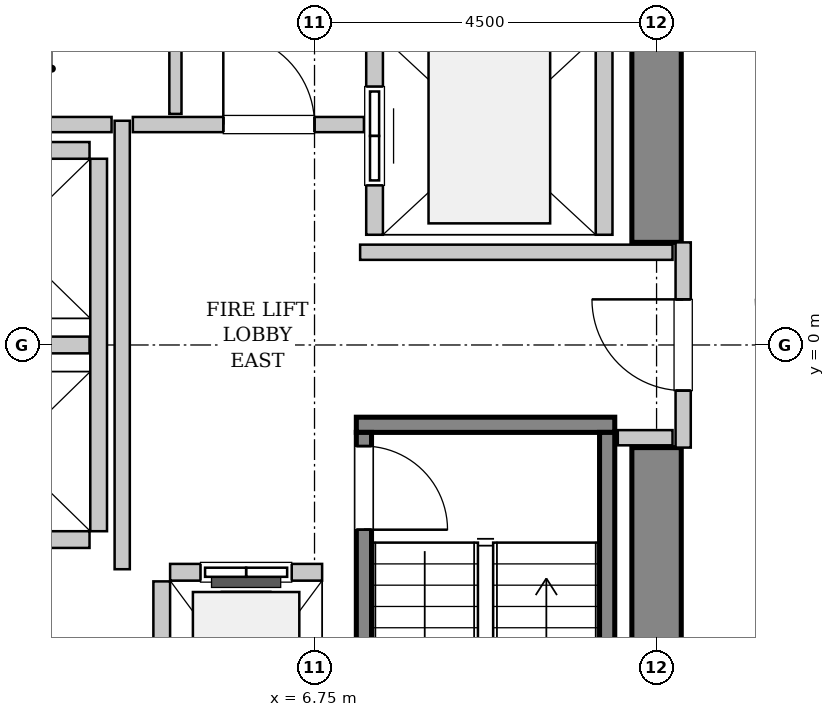
"""IFC4 building model, lengths in metres.
Left out: names, types, materials, properties, quantities, classifications, styles, units other than length and angle.
Written with IfcOpenShell. Run it as: python <this file> out.ifc"""

import sys

from ifc_helpers import new_model, si_unit, direction, frame, frame_2d, origin, place, context, subcontext, project, spatial, rectangle, extrude, source, transform, mapped, element, fill, save


model = new_model("IFC4")
c1 = context("Model", 3, precision=1e-05, world=origin(), true_north=direction((0.0, 1.0)))
c2 = subcontext(c1, "Body", "Model", "MODEL_VIEW")
j1 = project(units=[si_unit("LENGTHUNIT", "METRE"), si_unit("PLANEANGLEUNIT", "RADIAN")], contexts=[c1])
p1 = place(None, origin())
s1 = spatial("IfcSite", under=j1, at=p1, CompositionType="ELEMENT")
p2 = place(p1, origin())
s2 = spatial("IfcBuilding", under=s1, at=p2, CompositionType="ELEMENT")
p3 = place(p2, frame((0.0, 0.0, 27.6)))
s3 = spatial("IfcBuildingStorey", under=s2, at=p3, CompositionType="ELEMENT", Elevation=27.6)
m1 = source(origin(), c2, "Body", "SweptSolid", [
    extrude(rectangle(XDim=7.325, YDim=0.65, at=frame_2d((3.663, 0.0))), origin(), (0.0, 0.0, 1.0), 5.4),
])
for number, where, z_axis, x_axis in (
    (1, (11.25, -8.675, 0.0), (0.0, 0.0, 1.0), (0.0, 1.0, 0.0)),
    (2, (11.25, 1.35, 0.0), (0.0, 0.0, 1.0), (0.0, 1.0, 0.0)),
):
    element("IfcWall", number, at=place(p3, frame(where, z_axis=z_axis, x_axis=x_axis)), inside=s3, PredefinedType="SHEAR", context=c2, shape_type="MappedRepresentation", body=[
        mapped(m1, transform((0.0, 0.0, 0.0), x_axis=(1.0, 0.0, 0.0), y_axis=(0.0, 1.0, 0.0), z_axis=(0.0, 0.0, 1.0), scale=1.0)),
    ])
m2 = source(origin(), c2, "Body", "SweptSolid", [
    extrude(rectangle(XDim=3.4, YDim=0.2, at=frame_2d((1.7, 0.0))), origin(), (0.0, 0.0, 1.0), 5.4),
])
p4 = place(p3, frame((7.3, -1.05, 0.0), z_axis=(0.0, 0.0, 1.0), x_axis=(1.0, 0.0, 0.0)))
e3 = element("IfcWall", 3, at=p4, inside=s3, PredefinedType="SOLIDWALL", context=c2, shape_type="MappedRepresentation", body=[
    mapped(m2, transform((0.0, 0.0, 0.0), x_axis=(1.0, 0.0, 0.0), y_axis=(0.0, 1.0, 0.0), z_axis=(0.0, 0.0, 1.0), scale=1.0)),
])
m3 = source(origin(), c2, "Body", "SweptSolid", [
    extrude(rectangle(XDim=7.1, YDim=0.2, at=frame_2d((3.55, 0.0))), origin(), (0.0, 0.0, 1.0), 5.4),
])
p5 = place(p3, frame((7.4, -1.15, 0.0), z_axis=(0.0, 0.0, 1.0), x_axis=(0.0, -1.0, 0.0)))
e4 = element("IfcWall", 4, at=p5, inside=s3, PredefinedType="SOLIDWALL", context=c2, shape_type="MappedRepresentation", body=[
    mapped(m3, transform((0.0, 0.0, 0.0), x_axis=(1.0, 0.0, 0.0), y_axis=(0.0, 1.0, 0.0), z_axis=(0.0, 0.0, 1.0), scale=1.0)),
])
p6 = place(p5, frame((0.18, 0.0, 0.0)))
e5 = element("IfcOpeningElement", 5, at=p6, cuts=e4, PredefinedType="OPENING", context=c2, shape_type="SweptSolid", body=[
    extrude(rectangle(XDim=1.1, YDim=2.15, at=frame_2d((0.55, 1.075))), frame((0.0, 0.11, 0.0), z_axis=(0.0, -1.0, 0.0), x_axis=(1.0, 0.0, 0.0)), (0.0, 0.0, 1.0), 0.22),
])
p7 = place(p3, frame((10.6, -1.15, 0.0), z_axis=(0.0, 0.0, 1.0), x_axis=(0.0, -1.0, 0.0)))
e6 = element("IfcWall", 6, at=p7, inside=s3, PredefinedType="SOLIDWALL", context=c2, shape_type="MappedRepresentation", body=[
    mapped(m3, transform((0.0, 0.0, 0.0), x_axis=(1.0, 0.0, 0.0), y_axis=(0.0, 1.0, 0.0), z_axis=(0.0, 0.0, 1.0), scale=1.0)),
])
m4 = source(origin(), c2, "Body", "SweptSolid", [
    extrude(rectangle(XDim=2.0, YDim=0.22, at=frame_2d((1.0, 0.0))), origin(), (0.0, 0.0, 1.0), 5.135),
])
p8 = place(p3, frame((6.85, -2.99, 0.0), z_axis=(0.0, 0.0, 1.0), x_axis=(-1.0, 0.0, 0.0)))
e7 = element("IfcWall", 7, at=p8, inside=s3, PredefinedType="SOLIDWALL", context=c2, shape_type="MappedRepresentation", body=[
    mapped(m4, transform((0.0, 0.0, 0.0), x_axis=(1.0, 0.0, 0.0), y_axis=(0.0, 1.0, 0.0), z_axis=(0.0, 0.0, 1.0), scale=1.0)),
])
p9 = place(p8, frame((0.4, 0.0, 0.0)))
e8 = element("IfcOpeningElement", 8, at=p9, cuts=e7, PredefinedType="OPENING", context=c2, shape_type="SweptSolid", body=[
    extrude(rectangle(XDim=1.2, YDim=2.2, at=frame_2d((0.6, 1.1))), frame((0.0, 0.12, 0.0), z_axis=(0.0, -1.0, 0.0), x_axis=(1.0, 0.0, 0.0)), (0.0, 0.0, 1.0), 0.24),
])
m5 = source(origin(), c2, "Body", "SweptSolid", [
    extrude(rectangle(XDim=2.68, YDim=0.22, at=frame_2d((1.34, 0.0))), origin(), (0.0, 0.0, 1.0), 5.135),
])
p10 = place(p3, frame((4.74, -3.11, 0.0), z_axis=(0.0, 0.0, 1.0), x_axis=(0.0, -1.0, 0.0)))
e9 = element("IfcWall", 9, at=p10, inside=s3, PredefinedType="SOLIDWALL", context=c2, shape_type="MappedRepresentation", body=[
    mapped(m5, transform((0.0, 0.0, 0.0), x_axis=(1.0, 0.0, 0.0), y_axis=(0.0, 1.0, 0.0), z_axis=(0.0, 0.0, 1.0), scale=1.0)),
])
m6 = source(origin(), c2, "Body", "SweptSolid", [
    extrude(rectangle(XDim=5.45, YDim=0.22, at=frame_2d((2.725, 0.0))), origin(), (0.0, 0.0, 1.0), 5.135),
])
p11 = place(p3, frame((7.54, 6.9, 0.0), z_axis=(0.0, 0.0, 1.0), x_axis=(0.0, -1.0, 0.0)))
e10 = element("IfcWall", 10, at=p11, inside=s3, PredefinedType="SOLIDWALL", context=c2, shape_type="MappedRepresentation", body=[
    mapped(m6, transform((0.0, 0.0, 0.0), x_axis=(1.0, 0.0, 0.0), y_axis=(0.0, 1.0, 0.0), z_axis=(0.0, 0.0, 1.0), scale=1.0)),
])
p12 = place(p11, frame((3.5, 0.0, 0.0)))
e11 = element("IfcOpeningElement", 11, at=p12, cuts=e10, PredefinedType="OPENING", context=c2, shape_type="SweptSolid", body=[
    extrude(rectangle(XDim=1.3, YDim=2.3, at=frame_2d((0.65, 1.15))), frame((0.0, 0.12, 0.0), z_axis=(0.0, -1.0, 0.0), x_axis=(1.0, 0.0, 0.0)), (0.0, 0.0, 1.0), 0.24),
])
p13 = place(p11, frame((0.65, 0.0, 0.0)))
e12 = element("IfcOpeningElement", 12, at=p13, cuts=e10, PredefinedType="OPENING", context=c2, shape_type="SweptSolid", body=[
    extrude(rectangle(XDim=1.3, YDim=2.3, at=frame_2d((0.65, 1.15))), frame((0.0, 0.12, 0.0), z_axis=(0.0, -1.0, 0.0), x_axis=(1.0, 0.0, 0.0)), (0.0, 0.0, 1.0), 0.24),
])
p14 = place(p3, frame((10.56, 1.45, 0.0), z_axis=(0.0, 0.0, 1.0), x_axis=(0.0, 1.0, 0.0)))
e13 = element("IfcWall", 13, at=p14, inside=s3, PredefinedType="SOLIDWALL", context=c2, shape_type="MappedRepresentation", body=[
    mapped(m6, transform((0.0, 0.0, 0.0), x_axis=(1.0, 0.0, 0.0), y_axis=(0.0, 1.0, 0.0), z_axis=(0.0, 0.0, 1.0), scale=1.0)),
])
m7 = source(origin(), c2, "Body", "SweptSolid", [
    extrude(rectangle(XDim=4.9, YDim=0.22, at=frame_2d((2.45, 0.0))), origin(), (0.0, 0.0, 1.0), 5.135),
])
p15 = place(p3, frame((3.91, -2.45, 0.0), z_axis=(0.0, 0.0, 1.0), x_axis=(0.0, 1.0, 0.0)))
e14 = element("IfcWall", 14, at=p15, inside=s3, PredefinedType="SOLIDWALL", context=c2, shape_type="MappedRepresentation", body=[
    mapped(m7, transform((0.0, 0.0, 0.0), x_axis=(1.0, 0.0, 0.0), y_axis=(0.0, 1.0, 0.0), z_axis=(0.0, 0.0, 1.0), scale=1.0)),
])
m8 = source(origin(), c2, "Body", "SweptSolid", [
    extrude(rectangle(XDim=2.13, YDim=0.22, at=frame_2d((1.065, 0.0))), origin(), (0.0, 0.0, 1.0), 5.135),
])
for number, where, z_axis, x_axis in (
    (15, (1.66, -2.56, 0.0), (0.0, 0.0, 1.0), (1.0, 0.0, 0.0)),
    (16, (1.66, 0.0, 0.0), (0.0, 0.0, 1.0), (1.0, 0.0, 0.0)),
    (17, (3.79, 2.56, 0.0), (0.0, 0.0, 1.0), (-1.0, 0.0, 0.0)),
):
    element("IfcWall", number, at=place(p3, frame(where, z_axis=z_axis, x_axis=x_axis)), inside=s3, PredefinedType="SOLIDWALL", context=c2, shape_type="MappedRepresentation", body=[
        mapped(m8, transform((0.0, 0.0, 0.0), x_axis=(1.0, 0.0, 0.0), y_axis=(0.0, 1.0, 0.0), z_axis=(0.0, 0.0, 1.0), scale=1.0)),
    ])
m9 = source(origin(), c2, "Body", "SweptSolid", [
    extrude(rectangle(XDim=2.7, YDim=0.2, at=frame_2d((1.35, 0.0))), origin(), (0.0, 0.0, 1.0), 4.025),
])
p16 = place(p3, frame((11.6, -1.35, 0.0), z_axis=(0.0, 0.0, 1.0), x_axis=(0.0, 1.0, 0.0)))
e18 = element("IfcWall", 18, at=p16, inside=s3, PredefinedType="PARTITIONING", context=c2, shape_type="MappedRepresentation", body=[
    mapped(m9, transform((0.0, 0.0, 0.0), x_axis=(1.0, 0.0, 0.0), y_axis=(0.0, 1.0, 0.0), z_axis=(0.0, 0.0, 1.0), scale=1.0)),
])
p17 = place(p16, frame((0.75, 0.0, 0.0)))
e19 = element("IfcOpeningElement", 19, at=p17, cuts=e18, PredefinedType="OPENING", context=c2, shape_type="SweptSolid", body=[
    extrude(rectangle(XDim=1.2, YDim=2.15, at=frame_2d((0.6, 1.075))), frame((0.0, 0.11, 0.0), z_axis=(0.0, -1.0, 0.0), x_axis=(1.0, 0.0, 0.0)), (0.0, 0.0, 1.0), 0.22),
])
m10 = source(origin(), c2, "Body", "SweptSolid", [
    extrude(rectangle(XDim=5.9, YDim=0.2, at=frame_2d((2.95, 0.0))), origin(), (0.0, 0.0, 1.0), 5.135),
])
p18 = place(p3, frame((4.22, -2.95, 0.0), z_axis=(0.0, 0.0, 1.0), x_axis=(0.0, 1.0, 0.0)))
e20 = element("IfcWall", 20, at=p18, inside=s3, PredefinedType="PARTITIONING", context=c2, shape_type="MappedRepresentation", body=[
    mapped(m10, transform((0.0, 0.0, 0.0), x_axis=(1.0, 0.0, 0.0), y_axis=(0.0, 1.0, 0.0), z_axis=(0.0, 0.0, 1.0), scale=1.0)),
])
m11 = source(origin(), c2, "Body", "SweptSolid", [
    extrude(rectangle(XDim=2.52, YDim=0.2, at=frame_2d((1.26, 0.0))), origin(), (0.0, 0.0, 1.0), 5.135),
])
p19 = place(p3, frame((1.56, 2.9, 0.0), z_axis=(0.0, 0.0, 1.0), x_axis=(1.0, 0.0, 0.0)))
e21 = element("IfcWall", 21, at=p19, inside=s3, PredefinedType="PARTITIONING", context=c2, shape_type="MappedRepresentation", body=[
    mapped(m11, transform((0.0, 0.0, 0.0), x_axis=(1.0, 0.0, 0.0), y_axis=(0.0, 1.0, 0.0), z_axis=(0.0, 0.0, 1.0), scale=1.0)),
])
m12 = source(origin(), c2, "Body", "SweptSolid", [
    extrude(rectangle(XDim=3.04, YDim=0.2, at=frame_2d((1.52, 0.0))), origin(), (0.0, 0.0, 1.0), 5.135),
])
p20 = place(p3, frame((4.36, 2.9, 0.0), z_axis=(0.0, 0.0, 1.0), x_axis=(1.0, 0.0, 0.0)))
e22 = element("IfcWall", 22, at=p20, inside=s3, PredefinedType="PARTITIONING", context=c2, shape_type="MappedRepresentation", body=[
    mapped(m12, transform((0.0, 0.0, 0.0), x_axis=(1.0, 0.0, 0.0), y_axis=(0.0, 1.0, 0.0), z_axis=(0.0, 0.0, 1.0), scale=1.0)),
])
p21 = place(p20, frame((1.19, 0.0, 0.0)))
e23 = element("IfcOpeningElement", 23, at=p21, cuts=e22, PredefinedType="OPENING", context=c2, shape_type="SweptSolid", body=[
    extrude(rectangle(XDim=1.2, YDim=2.15, at=frame_2d((0.6, 1.075))), frame((0.0, 0.11, 0.0), z_axis=(0.0, -1.0, 0.0), x_axis=(1.0, 0.0, 0.0)), (0.0, 0.0, 1.0), 0.22),
])
m13 = source(origin(), c2, "Body", "SweptSolid", [
    extrude(rectangle(XDim=4.11, YDim=0.2, at=frame_2d((2.055, 0.0))), origin(), (0.0, 0.0, 1.0), 5.135),
])
p22 = place(p3, frame((7.35, 1.22, 0.0), z_axis=(0.0, 0.0, 1.0), x_axis=(1.0, 0.0, 0.0)))
e24 = element("IfcWall", 24, at=p22, inside=s3, PredefinedType="PARTITIONING", context=c2, shape_type="MappedRepresentation", body=[
    mapped(m13, transform((0.0, 0.0, 0.0), x_axis=(1.0, 0.0, 0.0), y_axis=(0.0, 1.0, 0.0), z_axis=(0.0, 0.0, 1.0), scale=1.0)),
])
m14 = source(origin(), c2, "Body", "SweptSolid", [
    extrude(rectangle(XDim=0.72, YDim=0.2, at=frame_2d((0.36, 0.0))), origin(), (0.0, 0.0, 1.0), 5.135),
])
p23 = place(p3, frame((10.74, -1.22, 0.0), z_axis=(0.0, 0.0, 1.0), x_axis=(1.0, 0.0, 0.0)))
e25 = element("IfcWall", 25, at=p23, inside=s3, PredefinedType="PARTITIONING", context=c2, shape_type="MappedRepresentation", body=[
    mapped(m14, transform((0.0, 0.0, 0.0), x_axis=(1.0, 0.0, 0.0), y_axis=(0.0, 1.0, 0.0), z_axis=(0.0, 0.0, 1.0), scale=1.0)),
])
m15 = source(origin(), c2, "Body", "SweptSolid", [
    extrude(rectangle(XDim=3.015, YDim=0.16, at=frame_2d((1.507, 0.0))), origin(), (0.0, 0.0, 1.0), 5.135),
])
p24 = place(p3, frame((4.92, 3.04, 0.0), z_axis=(0.0, 0.0, 1.0), x_axis=(0.0, 1.0, 0.0)))
e26 = element("IfcWall", 26, at=p24, inside=s3, PredefinedType="PARTITIONING", context=c2, shape_type="MappedRepresentation", body=[
    mapped(m15, transform((0.0, 0.0, 0.0), x_axis=(1.0, 0.0, 0.0), y_axis=(0.0, 1.0, 0.0), z_axis=(0.0, 0.0, 1.0), scale=1.0)),
])
m16 = source(origin(), c2, "Body", "SweptSolid", [
    extrude(rectangle(XDim=1.1, YDim=2.15, at=frame_2d((0.55, 1.075))), frame((0.0, 0.025, 0.0), z_axis=(0.0, -1.0, 0.0), x_axis=(1.0, 0.0, 0.0)), (0.0, 0.0, 1.0), 0.05),
])
p25 = place(p6, origin())
e27 = element("IfcDoor", 27, at=p25, inside=s3, OperationType="SINGLE_SWING_RIGHT", PredefinedType="DOOR", context=c2, shape_type="MappedRepresentation", body=[
    mapped(m16, transform((0.0, 0.0, 0.0), x_axis=(1.0, 0.0, 0.0), y_axis=(0.0, 1.0, 0.0), z_axis=(0.0, 0.0, 1.0), scale=1.0)),
])
fill(e5, e27)
m17 = source(origin(), c2, "Body", "SweptSolid", [
    extrude(rectangle(XDim=1.2, YDim=2.2, at=frame_2d((0.6, 1.1))), frame((0.0, 0.025, 0.0), z_axis=(0.0, -1.0, 0.0), x_axis=(1.0, 0.0, 0.0)), (0.0, 0.0, 1.0), 0.05),
])
p26 = place(p9, origin())
e28 = element("IfcDoor", 28, at=p26, inside=s3, OperationType="SLIDING_TO_LEFT", PredefinedType="DOOR", context=c2, shape_type="MappedRepresentation", body=[
    mapped(m17, transform((0.0, 0.0, 0.0), x_axis=(1.0, 0.0, 0.0), y_axis=(0.0, 1.0, 0.0), z_axis=(0.0, 0.0, 1.0), scale=1.0)),
])
fill(e8, e28)
m18 = source(origin(), c2, "Body", "SweptSolid", [
    extrude(rectangle(XDim=1.3, YDim=2.3, at=frame_2d((0.65, 1.15))), frame((0.0, 0.025, 0.0), z_axis=(0.0, -1.0, 0.0), x_axis=(1.0, 0.0, 0.0)), (0.0, 0.0, 1.0), 0.05),
])
p27 = place(p12, origin())
e29 = element("IfcDoor", 29, at=p27, inside=s3, OperationType="SLIDING_TO_RIGHT", PredefinedType="DOOR", context=c2, shape_type="MappedRepresentation", body=[
    mapped(m18, transform((0.0, 0.0, 0.0), x_axis=(1.0, 0.0, 0.0), y_axis=(0.0, 1.0, 0.0), z_axis=(0.0, 0.0, 1.0), scale=1.0)),
])
fill(e11, e29)
m19 = source(origin(), c2, "Body", "SweptSolid", [
    extrude(rectangle(XDim=1.2, YDim=2.15, at=frame_2d((0.6, 1.075))), frame((0.0, 0.025, 0.0), z_axis=(0.0, -1.0, 0.0), x_axis=(1.0, 0.0, 0.0)), (0.0, 0.0, 1.0), 0.05),
])
p28 = place(p17, origin())
e30 = element("IfcDoor", 30, at=p28, inside=s3, OperationType="SINGLE_SWING_RIGHT", PredefinedType="DOOR", context=c2, shape_type="MappedRepresentation", body=[
    mapped(m19, transform((0.0, 0.0, 0.0), x_axis=(1.0, 0.0, 0.0), y_axis=(0.0, 1.0, 0.0), z_axis=(0.0, 0.0, 1.0), scale=1.0)),
])
fill(e19, e30)
p29 = place(p21, origin())
e31 = element("IfcDoor", 31, at=p29, inside=s3, OperationType="SINGLE_SWING_LEFT", PredefinedType="DOOR", context=c2, shape_type="MappedRepresentation", body=[
    mapped(m19, transform((0.0, 0.0, 0.0), x_axis=(1.0, 0.0, 0.0), y_axis=(0.0, 1.0, 0.0), z_axis=(0.0, 0.0, 1.0), scale=1.0)),
])
fill(e23, e31)
save(model, sys.argv[1])
